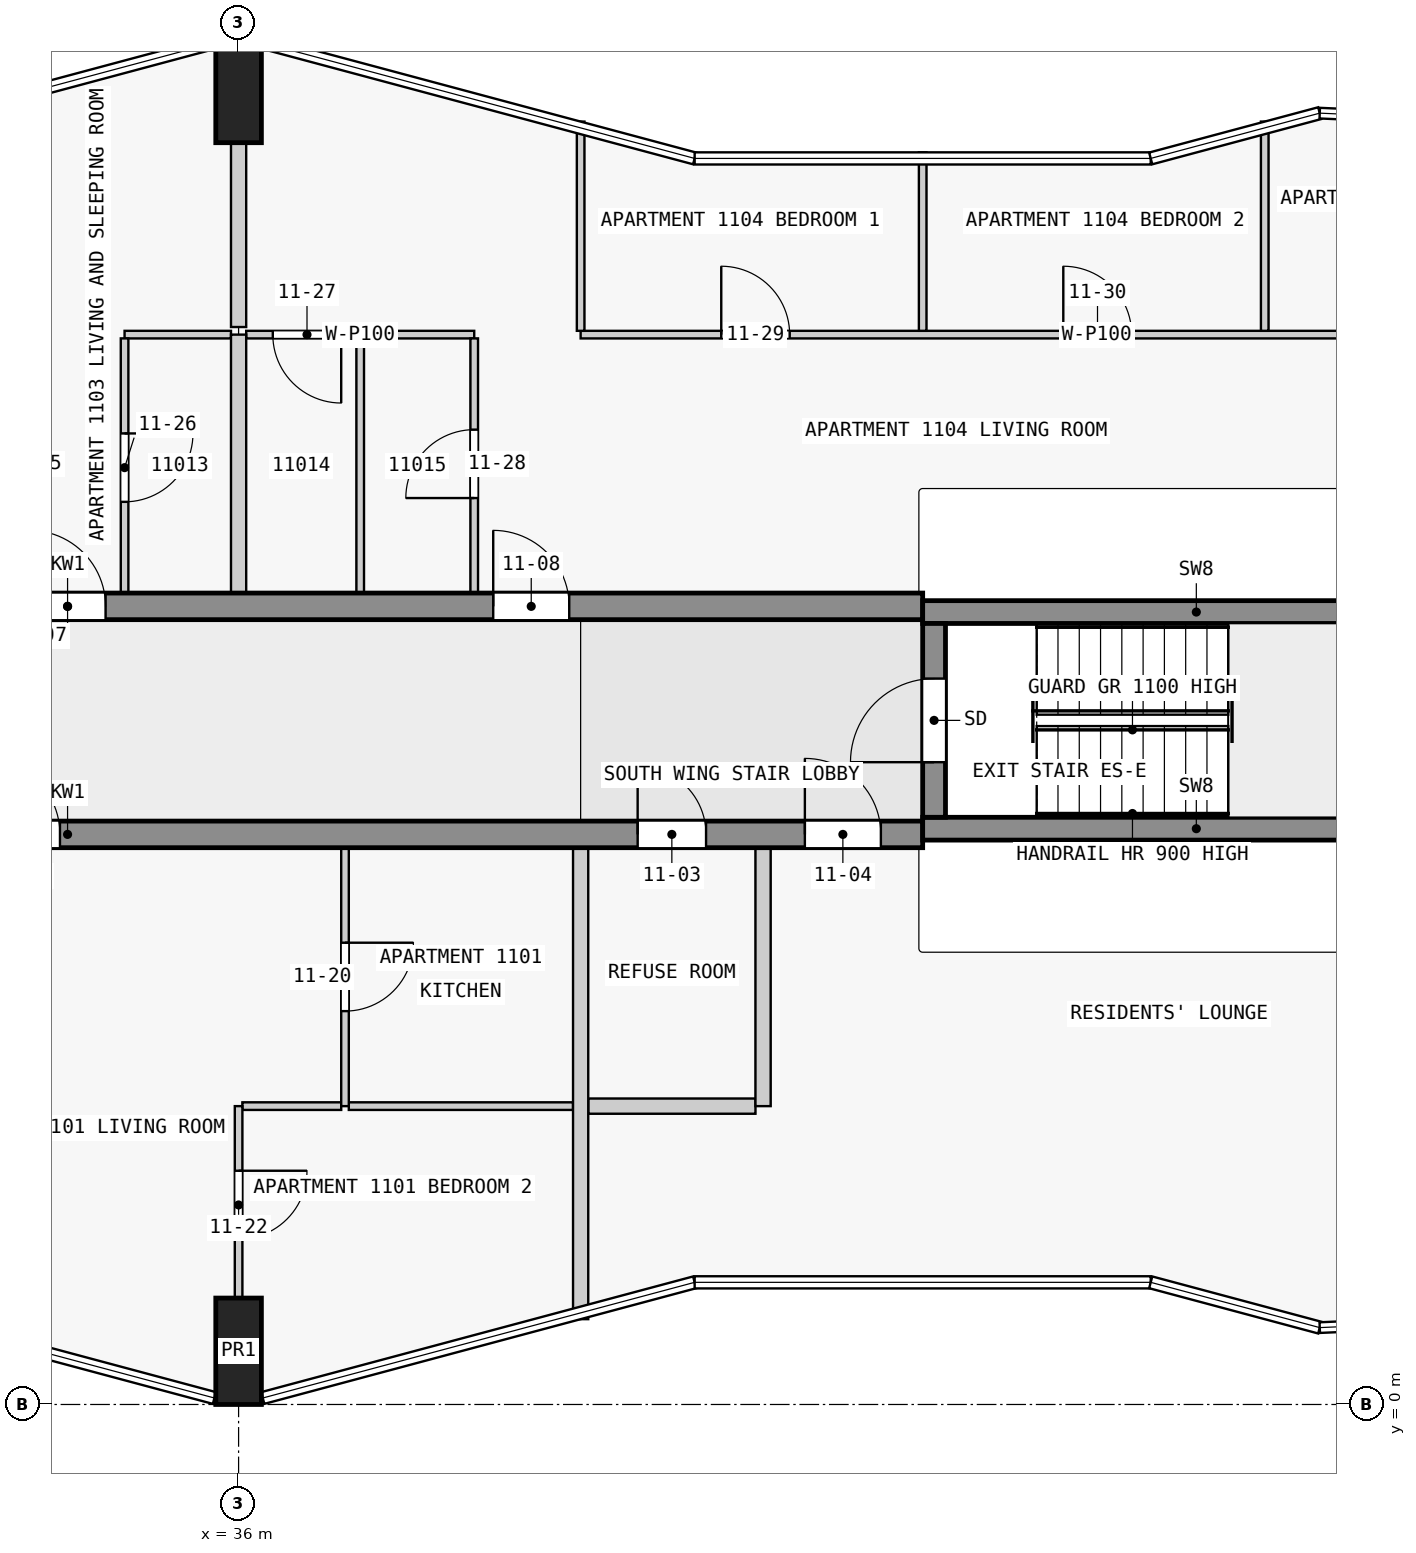
"""IFC4 building model, lengths in metres.
Left out: names, types, materials, properties, quantities, classifications, styles, units other than length and angle.
Written with IfcOpenShell. Run it as: python <this file> out.ifc"""

import sys

from ifc_helpers import new_model, si_unit, direction, frame, frame_2d, origin, origin_2d, place, context, subcontext, project, spatial, rectangle, extrude, element, fill, save


model = new_model("IFC4")
c1 = context("Model", 3, precision=1e-05, world=origin(), true_north=direction((0.0, 1.0)))
c2 = subcontext(c1, "Body", "Model", "MODEL_VIEW")
j1 = project(units=[si_unit("LENGTHUNIT", "METRE"), si_unit("PLANEANGLEUNIT", "RADIAN")], contexts=[c1])
p1 = place(None, origin())
s1 = spatial("IfcSite", under=j1, at=p1, CompositionType="ELEMENT")
p2 = place(p1, origin())
s2 = spatial("IfcBuilding", under=s1, at=p2, CompositionType="ELEMENT")
p3 = place(p2, frame((0.0, 0.0, 47.8)))
s3 = spatial("IfcBuildingStorey", under=s2, at=p3, CompositionType="ELEMENT", Elevation=47.8)
for number, where, z_axis, x_axis in (
    (1, (36.0, 0.7, 0.0), (0.0, 0.0, 1.0), (1.0, 0.0, 0.0)),
    (2, (36.0, 17.3, 0.0), (0.0, 0.0, 1.0), (1.0, 0.0, 0.0)),
):
    element("IfcColumn", number, at=place(p3, frame(where, z_axis=z_axis, x_axis=x_axis)), inside=s3, PredefinedType="COLUMN", context=c2, shape_type="SweptSolid", body=[
        extrude(rectangle(XDim=0.6, YDim=1.4, at=origin_2d()), origin(), (0.0, 0.0, 1.0), 3.5),
    ])
p4 = place(p3, frame((45.15, 7.725, 0.0), z_axis=(0.0, 0.0, 1.0), x_axis=(0.0, 1.0, 0.0)))
e3 = element("IfcWall", 3, at=p4, inside=s3, PredefinedType="SHEAR", context=c2, shape_type="SweptSolid", body=[
    extrude(rectangle(XDim=2.55, YDim=0.3, at=frame_2d((1.275, 0.0))), origin(), (0.0, 0.0, 1.0), 3.5),
])
p5 = place(p4, frame((0.725, 0.0, 0.0)))
e4 = element("IfcOpeningElement", 4, at=p5, cuts=e3, PredefinedType="OPENING", context=c2, shape_type="SweptSolid", body=[
    extrude(rectangle(XDim=1.1, YDim=2.1, at=frame_2d((0.55, 1.05))), frame((0.0, 0.16, 0.0), z_axis=(0.0, -1.0, 0.0), x_axis=(1.0, 0.0, 0.0)), (0.0, 0.0, 1.0), 0.32),
])
for number, where, z_axis, x_axis in (
    (5, (45.0, 7.575, 0.0), (0.0, 0.0, 1.0), (1.0, 0.0, 0.0)),
    (6, (45.0, 10.425, 0.0), (0.0, 0.0, 1.0), (1.0, 0.0, 0.0)),
):
    element("IfcWall", number, at=place(p3, frame(where, z_axis=z_axis, x_axis=x_axis)), inside=s3, PredefinedType="SHEAR", context=c2, shape_type="SweptSolid", body=[
        extrude(rectangle(XDim=7.2, YDim=0.3, at=frame_2d((3.6, 0.0))), origin(), (0.0, 0.0, 1.0), 3.5),
    ])
p6 = place(p3, frame((22.5, 7.5, 0.0), z_axis=(0.0, 0.0, 1.0), x_axis=(1.0, 0.0, 0.0)))
e7 = element("IfcWall", 7, at=p6, inside=s3, PredefinedType="SHEAR", context=c2, shape_type="SweptSolid", body=[
    extrude(rectangle(XDim=22.5, YDim=0.35, at=frame_2d((11.25, 0.0))), origin(), (0.0, 0.0, 1.0), 3.25),
])
p7 = place(p6, frame((1.75, 0.0, 0.0)))
e8 = element("IfcOpeningElement", 8, at=p7, cuts=e7, PredefinedType="OPENING", context=c2, shape_type="SweptSolid", body=[
    extrude(rectangle(XDim=1.0, YDim=2.1, at=frame_2d((0.5, 1.05))), frame((0.0, 0.185, 0.0), z_axis=(0.0, -1.0, 0.0), x_axis=(1.0, 0.0, 0.0)), (0.0, 0.0, 1.0), 0.37),
])
p8 = place(p6, frame((10.15, 0.0, 0.0)))
e9 = element("IfcOpeningElement", 9, at=p8, cuts=e7, PredefinedType="OPENING", context=c2, shape_type="SweptSolid", body=[
    extrude(rectangle(XDim=1.0, YDim=2.1, at=frame_2d((0.5, 1.05))), frame((0.0, 0.185, 0.0), z_axis=(0.0, -1.0, 0.0), x_axis=(1.0, 0.0, 0.0)), (0.0, 0.0, 1.0), 0.37),
])
p9 = place(p6, frame((18.75, 0.0, 0.0)))
e10 = element("IfcOpeningElement", 10, at=p9, cuts=e7, PredefinedType="OPENING", context=c2, shape_type="SweptSolid", body=[
    extrude(rectangle(XDim=0.9, YDim=2.1, at=frame_2d((0.45, 1.05))), frame((0.0, 0.185, 0.0), z_axis=(0.0, -1.0, 0.0), x_axis=(1.0, 0.0, 0.0)), (0.0, 0.0, 1.0), 0.37),
])
p10 = place(p6, frame((20.95, 0.0, 0.0)))
e11 = element("IfcOpeningElement", 11, at=p10, cuts=e7, PredefinedType="OPENING", context=c2, shape_type="SweptSolid", body=[
    extrude(rectangle(XDim=1.0, YDim=2.1, at=frame_2d((0.5, 1.05))), frame((0.0, 0.185, 0.0), z_axis=(0.0, -1.0, 0.0), x_axis=(1.0, 0.0, 0.0)), (0.0, 0.0, 1.0), 0.37),
])
p11 = place(p3, frame((22.5, 10.5, 0.0), z_axis=(0.0, 0.0, 1.0), x_axis=(1.0, 0.0, 0.0)))
e12 = element("IfcWall", 12, at=p11, inside=s3, PredefinedType="SHEAR", context=c2, shape_type="SweptSolid", body=[
    extrude(rectangle(XDim=22.5, YDim=0.35, at=frame_2d((11.25, 0.0))), origin(), (0.0, 0.0, 1.0), 3.25),
])
p12 = place(p11, frame((1.75, 0.0, 0.0)))
e13 = element("IfcOpeningElement", 13, at=p12, cuts=e12, PredefinedType="OPENING", context=c2, shape_type="SweptSolid", body=[
    extrude(rectangle(XDim=1.0, YDim=2.1, at=frame_2d((0.5, 1.05))), frame((0.0, 0.185, 0.0), z_axis=(0.0, -1.0, 0.0), x_axis=(1.0, 0.0, 0.0)), (0.0, 0.0, 1.0), 0.37),
])
p13 = place(p11, frame((6.25, 0.0, 0.0)))
e14 = element("IfcOpeningElement", 14, at=p13, cuts=e12, PredefinedType="OPENING", context=c2, shape_type="SweptSolid", body=[
    extrude(rectangle(XDim=1.0, YDim=2.1, at=frame_2d((0.5, 1.05))), frame((0.0, 0.185, 0.0), z_axis=(0.0, -1.0, 0.0), x_axis=(1.0, 0.0, 0.0)), (0.0, 0.0, 1.0), 0.37),
])
p14 = place(p11, frame((10.75, 0.0, 0.0)))
e15 = element("IfcOpeningElement", 15, at=p14, cuts=e12, PredefinedType="OPENING", context=c2, shape_type="SweptSolid", body=[
    extrude(rectangle(XDim=1.0, YDim=2.1, at=frame_2d((0.5, 1.05))), frame((0.0, 0.185, 0.0), z_axis=(0.0, -1.0, 0.0), x_axis=(1.0, 0.0, 0.0)), (0.0, 0.0, 1.0), 0.37),
])
p15 = place(p11, frame((16.85, 0.0, 0.0)))
e16 = element("IfcOpeningElement", 16, at=p15, cuts=e12, PredefinedType="OPENING", context=c2, shape_type="SweptSolid", body=[
    extrude(rectangle(XDim=1.0, YDim=2.1, at=frame_2d((0.5, 1.05))), frame((0.0, 0.185, 0.0), z_axis=(0.0, -1.0, 0.0), x_axis=(1.0, 0.0, 0.0)), (0.0, 0.0, 1.0), 0.37),
])
p16 = place(p3, frame((37.35, 3.925, 0.0), z_axis=(0.0, 0.0, 1.0), x_axis=(-1.0, 0.0, 0.0)))
e17 = element("IfcWall", 17, at=p16, inside=s3, PredefinedType="PARTITIONING", context=c2, shape_type="SweptSolid", body=[
    extrude(rectangle(XDim=1.3, YDim=0.1, at=frame_2d((0.65, 0.0))), origin(), (0.0, 0.0, 1.0), 3.25),
])
p17 = place(p3, frame((37.45, 3.925, 0.0), z_axis=(0.0, 0.0, 1.0), x_axis=(1.0, 0.0, 0.0)))
e18 = element("IfcWall", 18, at=p17, inside=s3, PredefinedType="PARTITIONING", context=c2, shape_type="SweptSolid", body=[
    extrude(rectangle(XDim=2.95, YDim=0.1, at=frame_2d((1.475, 0.0))), origin(), (0.0, 0.0, 1.0), 3.25),
])
p18 = place(p3, frame((40.6, 3.925, 0.0), z_axis=(0.0, 0.0, 1.0), x_axis=(1.0, 0.0, 0.0)))
e19 = element("IfcWall", 19, at=p18, inside=s3, PredefinedType="PARTITIONING", context=c2, shape_type="SweptSolid", body=[
    extrude(rectangle(XDim=2.2, YDim=0.2, at=frame_2d((1.1, 0.0))), origin(), (0.0, 0.0, 1.0), 3.25),
])
p19 = place(p3, frame((35.9, 14.075, 0.0), z_axis=(0.0, 0.0, 1.0), x_axis=(-1.0, 0.0, 0.0)))
e20 = element("IfcWall", 20, at=p19, inside=s3, PredefinedType="PARTITIONING", context=c2, shape_type="SweptSolid", body=[
    extrude(rectangle(XDim=1.4, YDim=0.1, at=frame_2d((0.7, 0.0))), origin(), (0.0, 0.0, 1.0), 3.25),
])
p20 = place(p3, frame((39.1, 14.075, 0.0), z_axis=(0.0, 0.0, 1.0), x_axis=(-1.0, 0.0, 0.0)))
e21 = element("IfcWall", 21, at=p20, inside=s3, PredefinedType="PARTITIONING", context=c2, shape_type="SweptSolid", body=[
    extrude(rectangle(XDim=3.0, YDim=0.1, at=frame_2d((1.5, 0.0))), origin(), (0.0, 0.0, 1.0), 3.25),
])
p21 = place(p20, frame((1.75, 0.0, 0.0)))
e22 = element("IfcOpeningElement", 22, at=p21, cuts=e21, PredefinedType="OPENING", context=c2, shape_type="SweptSolid", body=[
    extrude(rectangle(XDim=0.9, YDim=2.1, at=frame_2d((0.45, 1.05))), frame((0.0, 0.06, 0.0), z_axis=(0.0, -1.0, 0.0), x_axis=(1.0, 0.0, 0.0)), (0.0, 0.0, 1.0), 0.12),
])
p22 = place(p3, frame((40.5, 14.075, 0.0), z_axis=(0.0, 0.0, 1.0), x_axis=(1.0, 0.0, 0.0)))
e23 = element("IfcWall", 23, at=p22, inside=s3, PredefinedType="PARTITIONING", context=c2, shape_type="SweptSolid", body=[
    extrude(rectangle(XDim=13.58, YDim=0.1, at=frame_2d((6.79, 0.0))), origin(), (0.0, 0.0, 1.0), 3.25),
])
p23 = place(p22, frame((1.85, 0.0, 0.0)))
e24 = element("IfcOpeningElement", 24, at=p23, cuts=e23, PredefinedType="OPENING", context=c2, shape_type="SweptSolid", body=[
    extrude(rectangle(XDim=0.9, YDim=2.1, at=frame_2d((0.45, 1.05))), frame((0.0, 0.06, 0.0), z_axis=(0.0, -1.0, 0.0), x_axis=(1.0, 0.0, 0.0)), (0.0, 0.0, 1.0), 0.12),
])
p24 = place(p22, frame((6.35, 0.0, 0.0)))
e25 = element("IfcOpeningElement", 25, at=p24, cuts=e23, PredefinedType="OPENING", context=c2, shape_type="SweptSolid", body=[
    extrude(rectangle(XDim=0.9, YDim=2.1, at=frame_2d((0.45, 1.05))), frame((0.0, 0.06, 0.0), z_axis=(0.0, -1.0, 0.0), x_axis=(1.0, 0.0, 0.0)), (0.0, 0.0, 1.0), 0.12),
])
p25 = place(p22, frame((10.65, 0.0, 0.0)))
e26 = element("IfcOpeningElement", 26, at=p25, cuts=e23, PredefinedType="OPENING", context=c2, shape_type="SweptSolid", body=[
    extrude(rectangle(XDim=0.9, YDim=2.1, at=frame_2d((0.45, 1.05))), frame((0.0, 0.06, 0.0), z_axis=(0.0, -1.0, 0.0), x_axis=(1.0, 0.0, 0.0)), (0.0, 0.0, 1.0), 0.12),
])
p26 = place(p3, frame((34.5, 14.025, 0.0), z_axis=(0.0, 0.0, 1.0), x_axis=(0.0, -1.0, 0.0)))
e27 = element("IfcWall", 27, at=p26, inside=s3, PredefinedType="PARTITIONING", context=c2, shape_type="SweptSolid", body=[
    extrude(rectangle(XDim=3.35, YDim=0.1, at=frame_2d((1.675, 0.0))), origin(), (0.0, 0.0, 1.0), 3.25),
])
p27 = place(p26, frame((1.25, 0.0, 0.0)))
e28 = element("IfcOpeningElement", 28, at=p27, cuts=e27, PredefinedType="OPENING", context=c2, shape_type="SweptSolid", body=[
    extrude(rectangle(XDim=0.9, YDim=2.1, at=frame_2d((0.45, 1.05))), frame((0.0, 0.06, 0.0), z_axis=(0.0, -1.0, 0.0), x_axis=(1.0, 0.0, 0.0)), (0.0, 0.0, 1.0), 0.12),
])
p28 = place(p3, frame((36.0, 3.925, 0.0), z_axis=(0.0, 0.0, 1.0), x_axis=(0.0, -1.0, 0.0)))
e29 = element("IfcWall", 29, at=p28, inside=s3, PredefinedType="PARTITIONING", context=c2, shape_type="SweptSolid", body=[
    extrude(rectangle(XDim=2.525, YDim=0.1, at=frame_2d((1.263, 0.0))), origin(), (0.0, 0.0, 1.0), 3.25),
])
p29 = place(p28, frame((0.85, 0.0, 0.0)))
e30 = element("IfcOpeningElement", 30, at=p29, cuts=e29, PredefinedType="OPENING", context=c2, shape_type="SweptSolid", body=[
    extrude(rectangle(XDim=0.9, YDim=2.1, at=frame_2d((0.45, 1.05))), frame((0.0, 0.06, 0.0), z_axis=(0.0, -1.0, 0.0), x_axis=(1.0, 0.0, 0.0)), (0.0, 0.0, 1.0), 0.12),
])
p30 = place(p3, frame((36.0, 16.6, 0.0), z_axis=(0.0, 0.0, 1.0), x_axis=(0.0, -1.0, 0.0)))
e31 = element("IfcWall", 31, at=p30, inside=s3, PredefinedType="PARTITIONING", context=c2, shape_type="SweptSolid", body=[
    extrude(rectangle(XDim=2.425, YDim=0.2, at=frame_2d((1.212, 0.0))), origin(), (0.0, 0.0, 1.0), 3.25),
])
p31 = place(p3, frame((36.0, 10.675, 0.0), z_axis=(0.0, 0.0, 1.0), x_axis=(0.0, 1.0, 0.0)))
e32 = element("IfcWall", 32, at=p31, inside=s3, PredefinedType="PARTITIONING", context=c2, shape_type="SweptSolid", body=[
    extrude(rectangle(XDim=3.4, YDim=0.2, at=frame_2d((1.7, 0.0))), origin(), (0.0, 0.0, 1.0), 3.25),
])
p32 = place(p3, frame((37.4, 7.325, 0.0), z_axis=(0.0, 0.0, 1.0), x_axis=(0.0, -1.0, 0.0)))
e33 = element("IfcWall", 33, at=p32, inside=s3, PredefinedType="PARTITIONING", context=c2, shape_type="SweptSolid", body=[
    extrude(rectangle(XDim=3.4, YDim=0.1, at=frame_2d((1.7, 0.0))), origin(), (0.0, 0.0, 1.0), 3.25),
])
p33 = place(p32, frame((1.25, 0.0, 0.0)))
e34 = element("IfcOpeningElement", 34, at=p33, cuts=e33, PredefinedType="OPENING", context=c2, shape_type="SweptSolid", body=[
    extrude(rectangle(XDim=0.9, YDim=2.1, at=frame_2d((0.45, 1.05))), frame((0.0, 0.06, 0.0), z_axis=(0.0, -1.0, 0.0), x_axis=(1.0, 0.0, 0.0)), (0.0, 0.0, 1.0), 0.12),
])
p34 = place(p3, frame((37.6, 10.675, 0.0), z_axis=(0.0, 0.0, 1.0), x_axis=(0.0, 1.0, 0.0)))
e35 = element("IfcWall", 35, at=p34, inside=s3, PredefinedType="PARTITIONING", context=c2, shape_type="SweptSolid", body=[
    extrude(rectangle(XDim=3.35, YDim=0.1, at=frame_2d((1.675, 0.0))), origin(), (0.0, 0.0, 1.0), 3.25),
])
p35 = place(p3, frame((39.1, 10.675, 0.0), z_axis=(0.0, 0.0, 1.0), x_axis=(0.0, 1.0, 0.0)))
e36 = element("IfcWall", 36, at=p35, inside=s3, PredefinedType="PARTITIONING", context=c2, shape_type="SweptSolid", body=[
    extrude(rectangle(XDim=3.35, YDim=0.1, at=frame_2d((1.675, 0.0))), origin(), (0.0, 0.0, 1.0), 3.25),
])
p36 = place(p35, frame((1.25, 0.0, 0.0)))
e37 = element("IfcOpeningElement", 37, at=p36, cuts=e36, PredefinedType="OPENING", context=c2, shape_type="SweptSolid", body=[
    extrude(rectangle(XDim=0.9, YDim=2.1, at=frame_2d((0.45, 1.05))), frame((0.0, 0.06, 0.0), z_axis=(0.0, -1.0, 0.0), x_axis=(1.0, 0.0, 0.0)), (0.0, 0.0, 1.0), 0.12),
])
p37 = place(p3, frame((40.5, 16.878, 0.0), z_axis=(0.0, 0.0, 1.0), x_axis=(0.0, -1.0, 0.0)))
e38 = element("IfcWall", 38, at=p37, inside=s3, PredefinedType="PARTITIONING", context=c2, shape_type="SweptSolid", body=[
    extrude(rectangle(XDim=2.753, YDim=0.1, at=frame_2d((1.376, 0.0))), origin(), (0.0, 0.0, 1.0), 3.25),
])
p38 = place(p3, frame((40.5, 1.122, 0.0), z_axis=(0.0, 0.0, 1.0), x_axis=(0.0, 1.0, 0.0)))
e39 = element("IfcWall", 39, at=p38, inside=s3, PredefinedType="PARTITIONING", context=c2, shape_type="SweptSolid", body=[
    extrude(rectangle(XDim=6.203, YDim=0.2, at=frame_2d((3.101, 0.0))), origin(), (0.0, 0.0, 1.0), 3.25),
])
p39 = place(p3, frame((42.9, 3.925, 0.0), z_axis=(0.0, 0.0, 1.0), x_axis=(0.0, 1.0, 0.0)))
e40 = element("IfcWall", 40, at=p39, inside=s3, PredefinedType="PARTITIONING", context=c2, shape_type="SweptSolid", body=[
    extrude(rectangle(XDim=3.4, YDim=0.2, at=frame_2d((1.7, 0.0))), origin(), (0.0, 0.0, 1.0), 3.25),
])
p40 = place(p3, frame((45.0, 14.125, 0.0), z_axis=(0.0, 0.0, 1.0), x_axis=(0.0, 1.0, 0.0)))
e41 = element("IfcWall", 41, at=p40, inside=s3, PredefinedType="PARTITIONING", context=c2, shape_type="SweptSolid", body=[
    extrude(rectangle(XDim=2.348, YDim=0.1, at=frame_2d((1.174, 0.0))), origin(), (0.0, 0.0, 1.0), 3.25),
])
p41 = place(p3, frame((49.5, 14.125, 0.0), z_axis=(0.0, 0.0, 1.0), x_axis=(0.0, 1.0, 0.0)))
e42 = element("IfcWall", 42, at=p41, inside=s3, PredefinedType="PARTITIONING", context=c2, shape_type="SweptSolid", body=[
    extrude(rectangle(XDim=2.753, YDim=0.1, at=frame_2d((1.376, 0.0))), origin(), (0.0, 0.0, 1.0), 3.25),
])
p42 = place(p5, origin())
e43 = element("IfcDoor", 43, at=p42, inside=s3, OperationType="SINGLE_SWING_LEFT", PredefinedType="DOOR", context=c2, shape_type="SweptSolid", body=[
    extrude(rectangle(XDim=1.1, YDim=2.1, at=frame_2d((0.55, 1.05))), frame((0.0, 0.025, 0.0), z_axis=(0.0, -1.0, 0.0), x_axis=(1.0, 0.0, 0.0)), (0.0, 0.0, 1.0), 0.05),
])
fill(e4, e43)
p43 = place(p8, origin())
e44 = element("IfcDoor", 44, at=p43, inside=s3, OperationType="SINGLE_SWING_LEFT", PredefinedType="DOOR", context=c2, shape_type="SweptSolid", body=[
    extrude(rectangle(XDim=1.0, YDim=2.1, at=frame_2d((0.5, 1.05))), frame((0.0, 0.025, 0.0), z_axis=(0.0, -1.0, 0.0), x_axis=(1.0, 0.0, 0.0)), (0.0, 0.0, 1.0), 0.05),
])
fill(e9, e44)
p44 = place(p9, origin())
e45 = element("IfcDoor", 45, at=p44, inside=s3, OperationType="SINGLE_SWING_RIGHT", PredefinedType="DOOR", context=c2, shape_type="SweptSolid", body=[
    extrude(rectangle(XDim=0.9, YDim=2.1, at=frame_2d((0.45, 1.05))), frame((0.0, 0.025, 0.0), z_axis=(0.0, -1.0, 0.0), x_axis=(1.0, 0.0, 0.0)), (0.0, 0.0, 1.0), 0.05),
])
fill(e10, e45)
p45 = place(p10, origin())
e46 = element("IfcDoor", 46, at=p45, inside=s3, OperationType="SINGLE_SWING_RIGHT", PredefinedType="DOOR", context=c2, shape_type="SweptSolid", body=[
    extrude(rectangle(XDim=1.0, YDim=2.1, at=frame_2d((0.5, 1.05))), frame((0.0, 0.025, 0.0), z_axis=(0.0, -1.0, 0.0), x_axis=(1.0, 0.0, 0.0)), (0.0, 0.0, 1.0), 0.05),
])
fill(e11, e46)
p46 = place(p14, origin())
e47 = element("IfcDoor", 47, at=p46, inside=s3, OperationType="SINGLE_SWING_LEFT", PredefinedType="DOOR", context=c2, shape_type="SweptSolid", body=[
    extrude(rectangle(XDim=1.0, YDim=2.1, at=frame_2d((0.5, 1.05))), frame((0.0, 0.025, 0.0), z_axis=(0.0, -1.0, 0.0), x_axis=(1.0, 0.0, 0.0)), (0.0, 0.0, 1.0), 0.05),
])
fill(e15, e47)
p47 = place(p15, origin())
e48 = element("IfcDoor", 48, at=p47, inside=s3, OperationType="SINGLE_SWING_RIGHT", PredefinedType="DOOR", context=c2, shape_type="SweptSolid", body=[
    extrude(rectangle(XDim=1.0, YDim=2.1, at=frame_2d((0.5, 1.05))), frame((0.0, 0.025, 0.0), z_axis=(0.0, -1.0, 0.0), x_axis=(1.0, 0.0, 0.0)), (0.0, 0.0, 1.0), 0.05),
])
fill(e16, e48)
p48 = place(p33, origin())
e49 = element("IfcDoor", 49, at=p48, inside=s3, OperationType="SINGLE_SWING_LEFT", PredefinedType="DOOR", context=c2, shape_type="SweptSolid", body=[
    extrude(rectangle(XDim=0.9, YDim=2.1, at=frame_2d((0.45, 1.05))), frame((0.0, 0.025, 0.0), z_axis=(0.0, -1.0, 0.0), x_axis=(1.0, 0.0, 0.0)), (0.0, 0.0, 1.0), 0.05),
])
fill(e34, e49)
p49 = place(p29, origin())
e50 = element("IfcDoor", 50, at=p49, inside=s3, OperationType="SINGLE_SWING_RIGHT", PredefinedType="DOOR", context=c2, shape_type="SweptSolid", body=[
    extrude(rectangle(XDim=0.9, YDim=2.1, at=frame_2d((0.45, 1.05))), frame((0.0, 0.025, 0.0), z_axis=(0.0, -1.0, 0.0), x_axis=(1.0, 0.0, 0.0)), (0.0, 0.0, 1.0), 0.05),
])
fill(e30, e50)
p50 = place(p27, origin())
e51 = element("IfcDoor", 51, at=p50, inside=s3, OperationType="SINGLE_SWING_RIGHT", PredefinedType="DOOR", context=c2, shape_type="SweptSolid", body=[
    extrude(rectangle(XDim=0.9, YDim=2.1, at=frame_2d((0.45, 1.05))), frame((0.0, 0.025, 0.0), z_axis=(0.0, -1.0, 0.0), x_axis=(1.0, 0.0, 0.0)), (0.0, 0.0, 1.0), 0.05),
])
fill(e28, e51)
p51 = place(p21, origin())
e52 = element("IfcDoor", 52, at=p51, inside=s3, OperationType="SINGLE_SWING_RIGHT", PredefinedType="DOOR", context=c2, shape_type="SweptSolid", body=[
    extrude(rectangle(XDim=0.9, YDim=2.1, at=frame_2d((0.45, 1.05))), frame((0.0, 0.025, 0.0), z_axis=(0.0, -1.0, 0.0), x_axis=(1.0, 0.0, 0.0)), (0.0, 0.0, 1.0), 0.05),
])
fill(e22, e52)
p52 = place(p36, origin())
e53 = element("IfcDoor", 53, at=p52, inside=s3, OperationType="SINGLE_SWING_RIGHT", PredefinedType="DOOR", context=c2, shape_type="SweptSolid", body=[
    extrude(rectangle(XDim=0.9, YDim=2.1, at=frame_2d((0.45, 1.05))), frame((0.0, 0.025, 0.0), z_axis=(0.0, -1.0, 0.0), x_axis=(1.0, 0.0, 0.0)), (0.0, 0.0, 1.0), 0.05),
])
fill(e37, e53)
p53 = place(p23, origin())
e54 = element("IfcDoor", 54, at=p53, inside=s3, OperationType="SINGLE_SWING_LEFT", PredefinedType="DOOR", context=c2, shape_type="SweptSolid", body=[
    extrude(rectangle(XDim=0.9, YDim=2.1, at=frame_2d((0.45, 1.05))), frame((0.0, 0.025, 0.0), z_axis=(0.0, -1.0, 0.0), x_axis=(1.0, 0.0, 0.0)), (0.0, 0.0, 1.0), 0.05),
])
fill(e24, e54)
p54 = place(p24, origin())
e55 = element("IfcDoor", 55, at=p54, inside=s3, OperationType="SINGLE_SWING_RIGHT", PredefinedType="DOOR", context=c2, shape_type="SweptSolid", body=[
    extrude(rectangle(XDim=0.9, YDim=2.1, at=frame_2d((0.45, 1.05))), frame((0.0, 0.025, 0.0), z_axis=(0.0, -1.0, 0.0), x_axis=(1.0, 0.0, 0.0)), (0.0, 0.0, 1.0), 0.05),
])
fill(e25, e55)
save(model, sys.argv[1])
